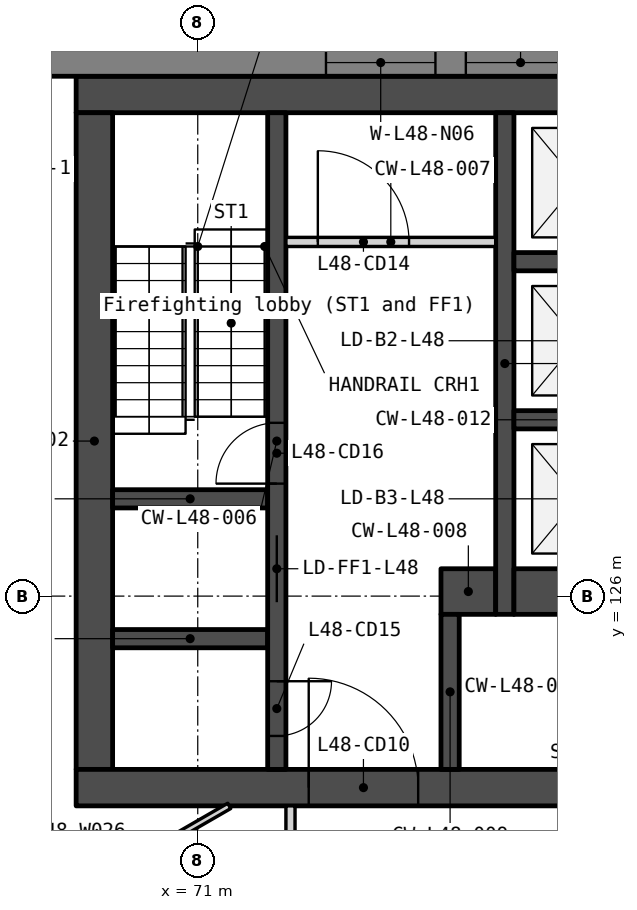
"""IFC4 building model, lengths in metres.
Left out: names, types, materials, properties, quantities, classifications, styles, units other than length and angle.
Written with IfcOpenShell. Run it as: python <this file> out.ifc"""

import sys

from ifc_helpers import new_model, si_unit, direction, frame, frame_2d, origin, place, context, subcontext, project, spatial, polyline, rectangle, outline, extrude, element, fill, save


model = new_model("IFC4")
c1 = context("Model", 3, precision=1e-05, world=origin(), true_north=direction((0.0, 1.0)))
c2 = subcontext(c1, "Body", "Model", "MODEL_VIEW")
j1 = project(units=[si_unit("LENGTHUNIT", "METRE"), si_unit("PLANEANGLEUNIT", "RADIAN")], contexts=[c1])
p1 = place(None, origin())
s1 = spatial("IfcSite", under=j1, at=p1, CompositionType="ELEMENT")
p2 = place(p1, origin())
s2 = spatial("IfcBuilding", under=s1, at=p2, CompositionType="ELEMENT")
p3 = place(p2, frame((0.0, 0.0, 191.9)))
s3 = spatial("IfcBuildingStorey", under=s2, at=p3, CompositionType="ELEMENT", Elevation=191.9)
p4 = place(p3, frame((69.0, 134.25, 0.0), z_axis=(0.0, 0.0, 1.0), x_axis=(1.0, 0.0, 0.0)))
e1 = element("IfcWall", 1, at=p4, inside=s3, PredefinedType="SOLIDWALL", context=c2, shape_type="SweptSolid", body=[
    extrude(rectangle(XDim=22.0, YDim=0.6, at=frame_2d((11.0, 0.0))), origin(), (0.0, 0.0, 1.0), 3.75),
])
p5 = place(p3, frame((69.3, 133.95, 0.0), z_axis=(0.0, 0.0, 1.0), x_axis=(0.0, -1.0, 0.0)))
e2 = element("IfcWall", 2, at=p5, inside=s3, PredefinedType="SOLIDWALL", context=c2, shape_type="SweptSolid", body=[
    extrude(rectangle(XDim=10.8, YDim=0.6, at=frame_2d((5.4, 0.0))), origin(), (0.0, 0.0, 1.0), 3.75),
])
p6 = place(p3, frame((69.0, 122.85, 0.0), z_axis=(0.0, 0.0, 1.0), x_axis=(1.0, 0.0, 0.0)))
e3 = element("IfcWall", 3, at=p6, inside=s3, PredefinedType="SOLIDWALL", context=c2, shape_type="SweptSolid", body=[
    extrude(rectangle(XDim=22.0, YDim=0.6, at=frame_2d((11.0, 0.0))), origin(), (0.0, 0.0, 1.0), 3.75),
])
p7 = place(p6, frame((16.375, 0.0, 0.0)))
e4 = element("IfcOpeningElement", 4, at=p7, cuts=e3, PredefinedType="OPENING", context=c2, shape_type="SweptSolid", body=[
    extrude(rectangle(XDim=1.8, YDim=2.1, at=frame_2d((0.9, 1.05))), frame((0.0, 0.31, 0.0), z_axis=(0.0, -1.0, 0.0), x_axis=(1.0, 0.0, 0.0)), (0.0, 0.0, 1.0), 0.62),
])
p8 = place(p6, frame((3.825, 0.0, 0.0)))
e5 = element("IfcOpeningElement", 5, at=p8, cuts=e3, PredefinedType="OPENING", context=c2, shape_type="SweptSolid", body=[
    extrude(rectangle(XDim=1.8, YDim=2.1, at=frame_2d((0.9, 1.05))), frame((0.0, 0.31, 0.0), z_axis=(0.0, -1.0, 0.0), x_axis=(1.0, 0.0, 0.0)), (0.0, 0.0, 1.0), 0.62),
])
p9 = place(p6, frame((12.85, 0.0, 0.0)))
e6 = element("IfcOpeningElement", 6, at=p9, cuts=e3, PredefinedType="OPENING", context=c2, shape_type="SweptSolid", body=[
    extrude(rectangle(XDim=1.5, YDim=2.1, at=frame_2d((0.75, 1.05))), frame((0.0, 0.31, 0.0), z_axis=(0.0, -1.0, 0.0), x_axis=(1.0, 0.0, 0.0)), (0.0, 0.0, 1.0), 0.62),
])
for number, where, z_axis, x_axis in (
    (7, (69.6, 127.6, 0.0), (0.0, 0.0, 1.0), (1.0, 0.0, 0.0)),
    (8, (69.6, 125.3, 0.0), (0.0, 0.0, 1.0), (1.0, 0.0, 0.0)),
):
    element("IfcWall", number, at=place(p3, frame(where, z_axis=z_axis, x_axis=x_axis)), inside=s3, PredefinedType="SOLIDWALL", context=c2, shape_type="SweptSolid", body=[
        extrude(rectangle(XDim=2.55, YDim=0.3, at=frame_2d((1.275, 0.0))), origin(), (0.0, 0.0, 1.0), 3.75),
    ])
p10 = place(p3, frame((72.3, 133.95, 0.0), z_axis=(0.0, 0.0, 1.0), x_axis=(0.0, -1.0, 0.0)))
e9 = element("IfcWall", 9, at=p10, inside=s3, PredefinedType="SOLIDWALL", context=c2, shape_type="SweptSolid", body=[
    extrude(rectangle(XDim=10.8, YDim=0.3, at=frame_2d((5.4, 0.0))), origin(), (0.0, 0.0, 1.0), 3.75),
])
p11 = place(p10, frame((6.95, 0.0, 0.0)))
e10 = element("IfcOpeningElement", 10, at=p11, cuts=e9, PredefinedType="OPENING", context=c2, shape_type="SweptSolid", body=[
    extrude(rectangle(XDim=1.1, YDim=2.1, at=frame_2d((0.55, 1.05))), frame((0.0, 0.16, 0.0), z_axis=(0.0, -1.0, 0.0), x_axis=(1.0, 0.0, 0.0)), (0.0, 0.0, 1.0), 0.32),
])
p12 = place(p10, frame((9.35, 0.0, 0.0)))
e11 = element("IfcOpeningElement", 11, at=p12, cuts=e9, PredefinedType="OPENING", context=c2, shape_type="SweptSolid", body=[
    extrude(rectangle(XDim=0.9, YDim=2.1, at=frame_2d((0.45, 1.05))), frame((0.0, 0.16, 0.0), z_axis=(0.0, -1.0, 0.0), x_axis=(1.0, 0.0, 0.0)), (0.0, 0.0, 1.0), 0.32),
])
p13 = place(p10, frame((5.1, 0.0, 0.0)))
e12 = element("IfcOpeningElement", 12, at=p13, cuts=e9, PredefinedType="OPENING", context=c2, shape_type="SweptSolid", body=[
    extrude(rectangle(XDim=1.0, YDim=2.1, at=frame_2d((0.5, 1.05))), frame((0.0, 0.16, 0.0), z_axis=(0.0, -1.0, 0.0), x_axis=(1.0, 0.0, 0.0)), (0.0, 0.0, 1.0), 0.32),
])
p14 = place(p3, frame((72.45, 131.825, 0.0), z_axis=(0.0, 0.0, 1.0), x_axis=(1.0, 0.0, 0.0)))
e13 = element("IfcWall", 13, at=p14, inside=s3, PredefinedType="PARTITIONING", context=c2, shape_type="SweptSolid", body=[
    extrude(rectangle(XDim=3.45, YDim=0.15, at=frame_2d((1.725, 0.0))), origin(), (0.0, 0.0, 1.0), 3.75),
])
p15 = place(p14, frame((0.525, 0.0, 0.0)))
e14 = element("IfcOpeningElement", 14, at=p15, cuts=e13, PredefinedType="OPENING", context=c2, shape_type="SweptSolid", body=[
    extrude(rectangle(XDim=1.5, YDim=2.1, at=frame_2d((0.75, 1.05))), frame((0.0, 0.085, 0.0), z_axis=(0.0, -1.0, 0.0), x_axis=(1.0, 0.0, 0.0)), (0.0, 0.0, 1.0), 0.17),
])
p16 = place(p3, frame((75.0, 126.075, 0.0), z_axis=(0.0, 0.0, 1.0), x_axis=(1.0, 0.0, 0.0)))
e15 = element("IfcWall", 15, at=p16, inside=s3, PredefinedType="SOLIDWALL", context=c2, shape_type="SweptSolid", body=[
    extrude(rectangle(XDim=0.9, YDim=0.75, at=frame_2d((0.45, 0.0))), origin(), (0.0, 0.0, 1.0), 3.75),
])
p17 = place(p3, frame((75.15, 125.7, 0.0), z_axis=(0.0, 0.0, 1.0), x_axis=(0.0, -1.0, 0.0)))
e16 = element("IfcWall", 16, at=p17, inside=s3, PredefinedType="SOLIDWALL", context=c2, shape_type="SweptSolid", body=[
    extrude(rectangle(XDim=2.55, YDim=0.3, at=frame_2d((1.275, 0.0))), origin(), (0.0, 0.0, 1.0), 3.75),
])
p18 = place(p3, frame((76.05, 133.95, 0.0), z_axis=(0.0, 0.0, 1.0), x_axis=(0.0, -1.0, 0.0)))
e17 = element("IfcWall", 17, at=p18, inside=s3, PredefinedType="SOLIDWALL", context=c2, shape_type="SweptSolid", body=[
    extrude(rectangle(XDim=8.25, YDim=0.3, at=frame_2d((4.125, 0.0))), origin(), (0.0, 0.0, 1.0), 3.75),
])
for number, where, z_axis, x_axis in (
    (18, (76.2, 131.5, 0.0), (0.0, 0.0, 1.0), (1.0, 0.0, 0.0)),
    (19, (76.2, 128.9, 0.0), (0.0, 0.0, 1.0), (1.0, 0.0, 0.0)),
):
    element("IfcWall", number, at=place(p3, frame(where, z_axis=z_axis, x_axis=x_axis)), inside=s3, PredefinedType="SOLIDWALL", context=c2, shape_type="SweptSolid", body=[
        extrude(rectangle(XDim=2.1, YDim=0.3, at=frame_2d((1.05, 0.0))), origin(), (0.0, 0.0, 1.0), 3.75),
    ])
p19 = place(p3, frame((76.2, 126.075, 0.0), z_axis=(0.0, 0.0, 1.0), x_axis=(1.0, 0.0, 0.0)))
e20 = element("IfcWall", 20, at=p19, inside=s3, PredefinedType="SOLIDWALL", context=c2, shape_type="SweptSolid", body=[
    extrude(rectangle(XDim=2.1, YDim=0.75, at=frame_2d((1.05, 0.0))), origin(), (0.0, 0.0, 1.0), 3.75),
])
p20 = place(p3, frame((99.365, 134.775, -0.15), z_axis=(0.0, 0.0, 1.0), x_axis=(-1.0, 0.0, 0.0)))
e21 = element("IfcWall", 21, at=p20, inside=s3, PredefinedType="SOLIDWALL", context=c2, shape_type="SweptSolid", body=[
    extrude(outline(polyline([(0.0, 0.0), (0.0, 3.9), (31.988, 3.9), (31.988, 0.0), (0.0, 0.0)])), frame((0.0, 0.225, 0.0), z_axis=(0.0, -1.0, 0.0), x_axis=(1.0, 0.0, 0.0)), (0.0, 0.0, 1.0), 0.45),
])
p21 = place(p20, frame((2.791, 0.0, 0.95)))
e22 = element("IfcOpeningElement", 22, at=p21, cuts=e21, PredefinedType="OPENING", context=c2, shape_type="SweptSolid", body=[
    extrude(rectangle(XDim=1.8, YDim=2.2, at=frame_2d((0.9, 1.1))), frame((0.0, 0.235, 0.0), z_axis=(0.0, -1.0, 0.0), x_axis=(1.0, 0.0, 0.0)), (0.0, 0.0, 1.0), 0.47),
])
p22 = place(p20, frame((5.091, 0.0, 0.95)))
e23 = element("IfcOpeningElement", 23, at=p22, cuts=e21, PredefinedType="OPENING", context=c2, shape_type="SweptSolid", body=[
    extrude(rectangle(XDim=1.8, YDim=2.2, at=frame_2d((0.9, 1.1))), frame((0.0, 0.235, 0.0), z_axis=(0.0, -1.0, 0.0), x_axis=(1.0, 0.0, 0.0)), (0.0, 0.0, 1.0), 0.47),
])
p23 = place(p20, frame((12.473, 0.0, 0.95)))
e24 = element("IfcOpeningElement", 24, at=p23, cuts=e21, PredefinedType="OPENING", context=c2, shape_type="SweptSolid", body=[
    extrude(rectangle(XDim=1.8, YDim=2.2, at=frame_2d((0.9, 1.1))), frame((0.0, 0.235, 0.0), z_axis=(0.0, -1.0, 0.0), x_axis=(1.0, 0.0, 0.0)), (0.0, 0.0, 1.0), 0.47),
])
p24 = place(p20, frame((14.773, 0.0, 0.95)))
e25 = element("IfcOpeningElement", 25, at=p24, cuts=e21, PredefinedType="OPENING", context=c2, shape_type="SweptSolid", body=[
    extrude(rectangle(XDim=1.8, YDim=2.2, at=frame_2d((0.9, 1.1))), frame((0.0, 0.235, 0.0), z_axis=(0.0, -1.0, 0.0), x_axis=(1.0, 0.0, 0.0)), (0.0, 0.0, 1.0), 0.47),
])
p25 = place(p20, frame((22.156, 0.0, 0.95)))
e26 = element("IfcOpeningElement", 26, at=p25, cuts=e21, PredefinedType="OPENING", context=c2, shape_type="SweptSolid", body=[
    extrude(rectangle(XDim=1.8, YDim=2.2, at=frame_2d((0.9, 1.1))), frame((0.0, 0.235, 0.0), z_axis=(0.0, -1.0, 0.0), x_axis=(1.0, 0.0, 0.0)), (0.0, 0.0, 1.0), 0.47),
])
p26 = place(p20, frame((24.456, 0.0, 0.95)))
e27 = element("IfcOpeningElement", 27, at=p26, cuts=e21, PredefinedType="OPENING", context=c2, shape_type="SweptSolid", body=[
    extrude(rectangle(XDim=1.8, YDim=2.2, at=frame_2d((0.9, 1.1))), frame((0.0, 0.235, 0.0), z_axis=(0.0, -1.0, 0.0), x_axis=(1.0, 0.0, 0.0)), (0.0, 0.0, 1.0), 0.47),
])
p27 = place(p3, frame((59.13, 132.168, -0.15), z_axis=(0.0, 0.0, 1.0), x_axis=(0.500002199942, -0.866024133644, 0.0)))
e28 = element("IfcWall", 28, at=p27, inside=s3, PredefinedType="SOLIDWALL", context=c2, shape_type="SweptSolid", body=[
    extrude(outline(polyline([(38.729, 0.0), (38.729, 3.9), (0.0, 3.9), (0.0, 0.0), (38.729, 0.0)])), frame((0.0, 0.225, 0.0), z_axis=(0.0, -1.0, 0.0), x_axis=(1.0, 0.0, 0.0)), (0.0, 0.0, 1.0), 0.45),
])
p28 = place(p27, frame((2.791, 0.0, 0.95)))
e29 = element("IfcOpeningElement", 29, at=p28, cuts=e28, PredefinedType="OPENING", context=c2, shape_type="SweptSolid", body=[
    extrude(rectangle(XDim=1.8, YDim=2.2, at=frame_2d((0.9, 1.1))), frame((0.0, 0.235, 0.0), z_axis=(0.0, -1.0, 0.0), x_axis=(1.0, 0.0, 0.0)), (0.0, 0.0, 1.0), 0.47),
])
p29 = place(p27, frame((5.091, 0.0, 0.95)))
e30 = element("IfcOpeningElement", 30, at=p29, cuts=e28, PredefinedType="OPENING", context=c2, shape_type="SweptSolid", body=[
    extrude(rectangle(XDim=1.8, YDim=2.2, at=frame_2d((0.9, 1.1))), frame((0.0, 0.235, 0.0), z_axis=(0.0, -1.0, 0.0), x_axis=(1.0, 0.0, 0.0)), (0.0, 0.0, 1.0), 0.47),
])
p30 = place(p27, frame((12.473, 0.0, 0.95)))
e31 = element("IfcOpeningElement", 31, at=p30, cuts=e28, PredefinedType="OPENING", context=c2, shape_type="SweptSolid", body=[
    extrude(rectangle(XDim=1.8, YDim=2.2, at=frame_2d((0.9, 1.1))), frame((0.0, 0.235, 0.0), z_axis=(0.0, -1.0, 0.0), x_axis=(1.0, 0.0, 0.0)), (0.0, 0.0, 1.0), 0.47),
])
p31 = place(p27, frame((14.773, 0.0, 0.95)))
e32 = element("IfcOpeningElement", 32, at=p31, cuts=e28, PredefinedType="OPENING", context=c2, shape_type="SweptSolid", body=[
    extrude(rectangle(XDim=1.8, YDim=2.2, at=frame_2d((0.9, 1.1))), frame((0.0, 0.235, 0.0), z_axis=(0.0, -1.0, 0.0), x_axis=(1.0, 0.0, 0.0)), (0.0, 0.0, 1.0), 0.47),
])
p32 = place(p27, frame((22.156, 0.0, 0.95)))
e33 = element("IfcOpeningElement", 33, at=p32, cuts=e28, PredefinedType="OPENING", context=c2, shape_type="SweptSolid", body=[
    extrude(rectangle(XDim=1.8, YDim=2.2, at=frame_2d((0.9, 1.1))), frame((0.0, 0.235, 0.0), z_axis=(0.0, -1.0, 0.0), x_axis=(1.0, 0.0, 0.0)), (0.0, 0.0, 1.0), 0.47),
])
p33 = place(p27, frame((24.456, 0.0, 0.95)))
e34 = element("IfcOpeningElement", 34, at=p33, cuts=e28, PredefinedType="OPENING", context=c2, shape_type="SweptSolid", body=[
    extrude(rectangle(XDim=1.8, YDim=2.2, at=frame_2d((0.9, 1.1))), frame((0.0, 0.235, 0.0), z_axis=(0.0, -1.0, 0.0), x_axis=(1.0, 0.0, 0.0)), (0.0, 0.0, 1.0), 0.47),
])
p34 = place(p27, frame((31.838, 0.0, 0.95)))
e35 = element("IfcOpeningElement", 35, at=p34, cuts=e28, PredefinedType="OPENING", context=c2, shape_type="SweptSolid", body=[
    extrude(rectangle(XDim=1.8, YDim=2.2, at=frame_2d((0.9, 1.1))), frame((0.0, 0.235, 0.0), z_axis=(0.0, -1.0, 0.0), x_axis=(1.0, 0.0, 0.0)), (0.0, 0.0, 1.0), 0.47),
])
p35 = place(p27, frame((34.138, 0.0, 0.95)))
e36 = element("IfcOpeningElement", 36, at=p35, cuts=e28, PredefinedType="OPENING", context=c2, shape_type="SweptSolid", body=[
    extrude(rectangle(XDim=1.8, YDim=2.2, at=frame_2d((0.9, 1.1))), frame((0.0, 0.235, 0.0), z_axis=(0.0, -1.0, 0.0), x_axis=(1.0, 0.0, 0.0)), (0.0, 0.0, 1.0), 0.47),
])
p36 = place(p3, frame((66.587, 119.703, 0.0), z_axis=(0.0, 0.0, 1.0), x_axis=(0.866023511746, 0.500003277092, 0.0)))
e37 = element("IfcWall", 37, at=p36, inside=s3, PredefinedType="PARTITIONING", context=c2, shape_type="SweptSolid", body=[
    extrude(rectangle(XDim=5.694, YDim=0.1, at=frame_2d((2.847, 0.0))), origin(), (0.0, 0.0, 1.0), 3.75),
])
p37 = place(p36, frame((2.397, 0.0, 0.0)))
e38 = element("IfcOpeningElement", 38, at=p37, cuts=e37, PredefinedType="OPENING", context=c2, shape_type="SweptSolid", body=[
    extrude(rectangle(XDim=0.9, YDim=2.1, at=frame_2d((0.45, 1.05))), frame((0.0, 0.06, 0.0), z_axis=(0.0, -1.0, 0.0), x_axis=(1.0, 0.0, 0.0)), (0.0, 0.0, 1.0), 0.12),
])
p38 = place(p3, frame((72.525, 120.05, 0.0), z_axis=(0.0, 0.0, 1.0), x_axis=(0.0, 1.0, 0.0)))
e39 = element("IfcWall", 39, at=p38, inside=s3, PredefinedType="PARTITIONING", context=c2, shape_type="SweptSolid", body=[
    extrude(rectangle(XDim=2.5, YDim=0.15, at=frame_2d((1.25, 0.0))), origin(), (0.0, 0.0, 1.0), 3.75),
])
p39 = place(p38, frame((0.75, 0.0, 0.0)))
e40 = element("IfcOpeningElement", 40, at=p39, cuts=e39, PredefinedType="OPENING", context=c2, shape_type="SweptSolid", body=[
    extrude(rectangle(XDim=1.0, YDim=2.1, at=frame_2d((0.5, 1.05))), frame((0.0, 0.085, 0.0), z_axis=(0.0, -1.0, 0.0), x_axis=(1.0, 0.0, 0.0)), (0.0, 0.0, 1.0), 0.17),
])
p40 = place(p11, origin())
e41 = element("IfcDoor", 41, at=p40, inside=s3, OperationType="SLIDING_TO_LEFT", PredefinedType="DOOR", context=c2, shape_type="SweptSolid", body=[
    extrude(rectangle(XDim=1.1, YDim=2.1, at=frame_2d((0.55, 1.05))), frame((0.0, 0.025, 0.0), z_axis=(0.0, -1.0, 0.0), x_axis=(1.0, 0.0, 0.0)), (0.0, 0.0, 1.0), 0.05),
])
fill(e10, e41)
p41 = place(p8, origin())
e42 = element("IfcDoor", 42, at=p41, inside=s3, OperationType="DOUBLE_DOOR_DOUBLE_SWING", PredefinedType="DOOR", context=c2, shape_type="SweptSolid", body=[
    extrude(rectangle(XDim=1.8, YDim=2.1, at=frame_2d((0.9, 1.05))), frame((0.0, 0.025, 0.0), z_axis=(0.0, -1.0, 0.0), x_axis=(1.0, 0.0, 0.0)), (0.0, 0.0, 1.0), 0.05),
])
fill(e5, e42)
p42 = place(p15, origin())
e43 = element("IfcDoor", 43, at=p42, inside=s3, OperationType="DOUBLE_DOOR_DOUBLE_SWING", PredefinedType="DOOR", context=c2, shape_type="SweptSolid", body=[
    extrude(rectangle(XDim=1.5, YDim=2.1, at=frame_2d((0.75, 1.05))), frame((0.0, 0.025, 0.0), z_axis=(0.0, -1.0, 0.0), x_axis=(1.0, 0.0, 0.0)), (0.0, 0.0, 1.0), 0.05),
])
fill(e14, e43)
p43 = place(p12, origin())
e44 = element("IfcDoor", 44, at=p43, inside=s3, OperationType="SINGLE_SWING_LEFT", PredefinedType="DOOR", context=c2, shape_type="SweptSolid", body=[
    extrude(rectangle(XDim=0.9, YDim=2.1, at=frame_2d((0.45, 1.05))), frame((0.0, 0.025, 0.0), z_axis=(0.0, -1.0, 0.0), x_axis=(1.0, 0.0, 0.0)), (0.0, 0.0, 1.0), 0.05),
])
fill(e11, e44)
p44 = place(p13, origin())
e45 = element("IfcDoor", 45, at=p44, inside=s3, OperationType="SINGLE_SWING_RIGHT", PredefinedType="DOOR", context=c2, shape_type="SweptSolid", body=[
    extrude(rectangle(XDim=1.0, YDim=2.1, at=frame_2d((0.5, 1.05))), frame((0.0, 0.025, 0.0), z_axis=(0.0, -1.0, 0.0), x_axis=(1.0, 0.0, 0.0)), (0.0, 0.0, 1.0), 0.05),
])
fill(e12, e45)
p45 = place(p25, origin())
e46 = element("IfcWindow", 46, at=p45, inside=s3, PartitioningType="SINGLE_PANEL", PredefinedType="WINDOW", context=c2, shape_type="SweptSolid", body=[
    extrude(rectangle(XDim=1.8, YDim=2.2, at=frame_2d((0.9, 1.1))), frame((0.0, 0.03, 0.0), z_axis=(0.0, -1.0, 0.0), x_axis=(1.0, 0.0, 0.0)), (0.0, 0.0, 1.0), 0.06),
])
fill(e26, e46)
p46 = place(p26, origin())
e47 = element("IfcWindow", 47, at=p46, inside=s3, PartitioningType="SINGLE_PANEL", PredefinedType="WINDOW", context=c2, shape_type="SweptSolid", body=[
    extrude(rectangle(XDim=1.8, YDim=2.2, at=frame_2d((0.9, 1.1))), frame((0.0, 0.03, 0.0), z_axis=(0.0, -1.0, 0.0), x_axis=(1.0, 0.0, 0.0)), (0.0, 0.0, 1.0), 0.06),
])
fill(e27, e47)
save(model, sys.argv[1])
